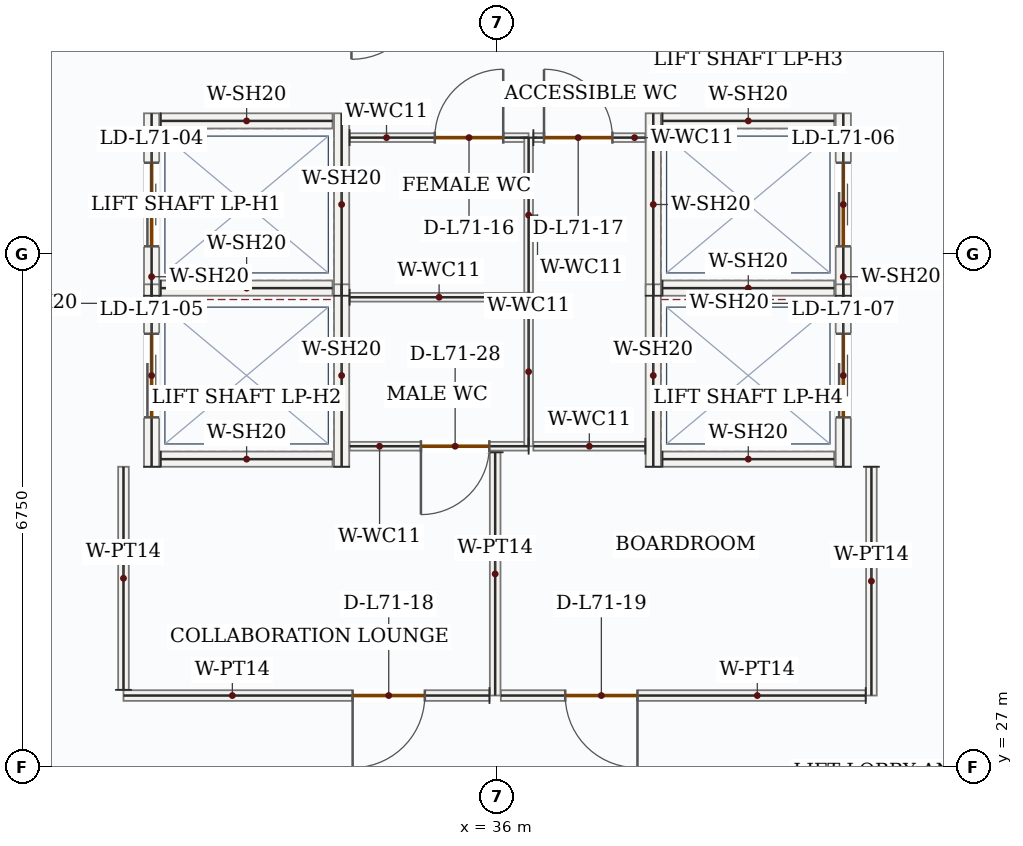
"""IFC4 building model, lengths in metres.
Left out: names, types, materials, properties, quantities, classifications, styles, units other than length and angle.
Written with IfcOpenShell. Run it as: python <this file> out.ifc"""

import sys

from ifc_helpers import new_model, si_unit, direction, frame, frame_2d, origin, place, context, subcontext, project, spatial, rectangle, extrude, source, transform, mapped, element, fill, save


model = new_model("IFC4")
c1 = context("Model", 3, precision=1e-05, world=origin(), true_north=direction((0.0, 1.0)))
c2 = subcontext(c1, "Body", "Model", "MODEL_VIEW")
j1 = project(units=[si_unit("LENGTHUNIT", "METRE"), si_unit("PLANEANGLEUNIT", "RADIAN")], contexts=[c1])
p1 = place(None, origin())
s1 = spatial("IfcSite", under=j1, at=p1, CompositionType="ELEMENT")
p2 = place(p1, origin())
s2 = spatial("IfcBuilding", under=s1, at=p2, CompositionType="ELEMENT")
p3 = place(p2, frame((0.0, 0.0, 295.35)))
s3 = spatial("IfcBuildingStorey", under=s2, at=p3, CompositionType="ELEMENT", Elevation=295.35)
p4 = place(p3, frame((31.45, 33.2, 0.0), z_axis=(0.0, 0.0, 1.0), x_axis=(0.0, 1.0, 0.0)))
e1 = element("IfcWall", 1, at=p4, inside=s3, PredefinedType="SOLIDWALL", context=c2, shape_type="SweptSolid", body=[
    extrude(rectangle(XDim=2.4, YDim=0.2, at=frame_2d((1.2, 0.0))), origin(), (0.0, 0.0, 1.0), 3.5),
])
p5 = place(p4, frame((0.65, 0.0, 0.0)))
e2 = element("IfcOpeningElement", 2, at=p5, cuts=e1, PredefinedType="OPENING", context=c2, shape_type="SweptSolid", body=[
    extrude(rectangle(XDim=1.1, YDim=2.15, at=frame_2d((0.55, 1.075))), frame((0.0, 0.11, 0.0), z_axis=(0.0, -1.0, 0.0), x_axis=(1.0, 0.0, 0.0)), (0.0, 0.0, 1.0), 0.22),
])
m1 = source(origin(), c2, "Body", "SweptSolid", [
    extrude(rectangle(XDim=2.4, YDim=0.2, at=frame_2d((1.2, 0.0))), origin(), (0.0, 0.0, 1.0), 3.5),
])
p6 = place(p3, frame((33.95, 33.2, 0.0), z_axis=(0.0, 0.0, 1.0), x_axis=(0.0, 1.0, 0.0)))
e3 = element("IfcWall", 3, at=p6, inside=s3, PredefinedType="SOLIDWALL", context=c2, shape_type="MappedRepresentation", body=[
    mapped(m1, transform((0.0, 0.0, 0.0), x_axis=(1.0, 0.0, 0.0), y_axis=(0.0, 1.0, 0.0), z_axis=(0.0, 0.0, 1.0), scale=1.0)),
])
m2 = source(origin(), c2, "Body", "SweptSolid", [
    extrude(rectangle(XDim=2.26, YDim=0.2, at=frame_2d((1.13, 0.0))), origin(), (0.0, 0.0, 1.0), 3.5),
])
for number, where, z_axis, x_axis in (
    (4, (31.57, 33.3, 0.0), (0.0, 0.0, 1.0), (1.0, 0.0, 0.0)),
    (5, (31.57, 35.5, 0.0), (0.0, 0.0, 1.0), (1.0, 0.0, 0.0)),
):
    element("IfcWall", number, at=place(p3, frame(where, z_axis=z_axis, x_axis=x_axis)), inside=s3, PredefinedType="SOLIDWALL", context=c2, shape_type="MappedRepresentation", body=[
        mapped(m2, transform((0.0, 0.0, 0.0), x_axis=(1.0, 0.0, 0.0), y_axis=(0.0, 1.0, 0.0), z_axis=(0.0, 0.0, 1.0), scale=1.0)),
    ])
p7 = place(p3, frame((31.45, 30.95, 0.0), z_axis=(0.0, 0.0, 1.0), x_axis=(0.0, 1.0, 0.0)))
e6 = element("IfcWall", 6, at=p7, inside=s3, PredefinedType="SOLIDWALL", context=c2, shape_type="SweptSolid", body=[
    extrude(rectangle(XDim=2.4, YDim=0.2, at=frame_2d((1.2, 0.0))), origin(), (0.0, 0.0, 1.0), 3.5),
])
p8 = place(p7, frame((0.65, 0.0, 0.0)))
e7 = element("IfcOpeningElement", 7, at=p8, cuts=e6, PredefinedType="OPENING", context=c2, shape_type="SweptSolid", body=[
    extrude(rectangle(XDim=1.1, YDim=2.15, at=frame_2d((0.55, 1.075))), frame((0.0, 0.11, 0.0), z_axis=(0.0, -1.0, 0.0), x_axis=(1.0, 0.0, 0.0)), (0.0, 0.0, 1.0), 0.22),
])
p9 = place(p3, frame((33.95, 30.95, 0.0), z_axis=(0.0, 0.0, 1.0), x_axis=(0.0, 1.0, 0.0)))
e8 = element("IfcWall", 8, at=p9, inside=s3, PredefinedType="SOLIDWALL", context=c2, shape_type="MappedRepresentation", body=[
    mapped(m1, transform((0.0, 0.0, 0.0), x_axis=(1.0, 0.0, 0.0), y_axis=(0.0, 1.0, 0.0), z_axis=(0.0, 0.0, 1.0), scale=1.0)),
])
p10 = place(p3, frame((31.57, 31.05, 0.0), z_axis=(0.0, 0.0, 1.0), x_axis=(1.0, 0.0, 0.0)))
e9 = element("IfcWall", 9, at=p10, inside=s3, PredefinedType="SOLIDWALL", context=c2, shape_type="MappedRepresentation", body=[
    mapped(m2, transform((0.0, 0.0, 0.0), x_axis=(1.0, 0.0, 0.0), y_axis=(0.0, 1.0, 0.0), z_axis=(0.0, 0.0, 1.0), scale=1.0)),
])
p11 = place(p3, frame((38.05, 33.2, 0.0), z_axis=(0.0, 0.0, 1.0), x_axis=(0.0, 1.0, 0.0)))
e10 = element("IfcWall", 10, at=p11, inside=s3, PredefinedType="SOLIDWALL", context=c2, shape_type="MappedRepresentation", body=[
    mapped(m1, transform((0.0, 0.0, 0.0), x_axis=(1.0, 0.0, 0.0), y_axis=(0.0, 1.0, 0.0), z_axis=(0.0, 0.0, 1.0), scale=1.0)),
])
p12 = place(p3, frame((40.55, 33.2, 0.0), z_axis=(0.0, 0.0, 1.0), x_axis=(0.0, 1.0, 0.0)))
e11 = element("IfcWall", 11, at=p12, inside=s3, PredefinedType="SOLIDWALL", context=c2, shape_type="SweptSolid", body=[
    extrude(rectangle(XDim=2.4, YDim=0.2, at=frame_2d((1.2, 0.0))), origin(), (0.0, 0.0, 1.0), 3.5),
])
p13 = place(p12, frame((0.65, 0.0, 0.0)))
e12 = element("IfcOpeningElement", 12, at=p13, cuts=e11, PredefinedType="OPENING", context=c2, shape_type="SweptSolid", body=[
    extrude(rectangle(XDim=1.1, YDim=2.15, at=frame_2d((0.55, 1.075))), frame((0.0, 0.11, 0.0), z_axis=(0.0, -1.0, 0.0), x_axis=(1.0, 0.0, 0.0)), (0.0, 0.0, 1.0), 0.22),
])
for number, where, z_axis, x_axis in (
    (13, (38.17, 33.3, 0.0), (0.0, 0.0, 1.0), (1.0, 0.0, 0.0)),
    (14, (38.17, 35.5, 0.0), (0.0, 0.0, 1.0), (1.0, 0.0, 0.0)),
):
    element("IfcWall", number, at=place(p3, frame(where, z_axis=z_axis, x_axis=x_axis)), inside=s3, PredefinedType="SOLIDWALL", context=c2, shape_type="MappedRepresentation", body=[
        mapped(m2, transform((0.0, 0.0, 0.0), x_axis=(1.0, 0.0, 0.0), y_axis=(0.0, 1.0, 0.0), z_axis=(0.0, 0.0, 1.0), scale=1.0)),
    ])
p14 = place(p3, frame((38.05, 30.95, 0.0), z_axis=(0.0, 0.0, 1.0), x_axis=(0.0, 1.0, 0.0)))
e15 = element("IfcWall", 15, at=p14, inside=s3, PredefinedType="SOLIDWALL", context=c2, shape_type="MappedRepresentation", body=[
    mapped(m1, transform((0.0, 0.0, 0.0), x_axis=(1.0, 0.0, 0.0), y_axis=(0.0, 1.0, 0.0), z_axis=(0.0, 0.0, 1.0), scale=1.0)),
])
p15 = place(p3, frame((40.55, 30.95, 0.0), z_axis=(0.0, 0.0, 1.0), x_axis=(0.0, 1.0, 0.0)))
e16 = element("IfcWall", 16, at=p15, inside=s3, PredefinedType="SOLIDWALL", context=c2, shape_type="SweptSolid", body=[
    extrude(rectangle(XDim=2.4, YDim=0.2, at=frame_2d((1.2, 0.0))), origin(), (0.0, 0.0, 1.0), 3.5),
])
p16 = place(p15, frame((0.65, 0.0, 0.0)))
e17 = element("IfcOpeningElement", 17, at=p16, cuts=e16, PredefinedType="OPENING", context=c2, shape_type="SweptSolid", body=[
    extrude(rectangle(XDim=1.1, YDim=2.15, at=frame_2d((0.55, 1.075))), frame((0.0, 0.11, 0.0), z_axis=(0.0, -1.0, 0.0), x_axis=(1.0, 0.0, 0.0)), (0.0, 0.0, 1.0), 0.22),
])
p17 = place(p3, frame((38.17, 31.05, 0.0), z_axis=(0.0, 0.0, 1.0), x_axis=(1.0, 0.0, 0.0)))
e18 = element("IfcWall", 18, at=p17, inside=s3, PredefinedType="SOLIDWALL", context=c2, shape_type="MappedRepresentation", body=[
    mapped(m2, transform((0.0, 0.0, 0.0), x_axis=(1.0, 0.0, 0.0), y_axis=(0.0, 1.0, 0.0), z_axis=(0.0, 0.0, 1.0), scale=1.0)),
])
p18 = place(p3, frame((36.41, 31.22, 0.0), z_axis=(0.0, 0.0, 1.0), x_axis=(-1.0, 0.0, 0.0)))
e19 = element("IfcWall", 19, at=p18, inside=s3, PredefinedType="PARTITIONING", context=c2, shape_type="SweptSolid", body=[
    extrude(rectangle(XDim=2.355, YDim=0.115, at=frame_2d((1.177, 0.0))), origin(), (0.0, 0.0, 1.0), 3.5),
])
p19 = place(p18, frame((0.517, 0.0, 0.0)))
e20 = element("IfcOpeningElement", 20, at=p19, cuts=e19, PredefinedType="OPENING", context=c2, shape_type="SweptSolid", body=[
    extrude(rectangle(XDim=0.9, YDim=2.1, at=frame_2d((0.45, 1.05))), frame((0.0, 0.067, 0.0), z_axis=(0.0, -1.0, 0.0), x_axis=(1.0, 0.0, 0.0)), (0.0, 0.0, 1.0), 0.135),
])
m3 = source(origin(), c2, "Body", "SweptSolid", [
    extrude(rectangle(XDim=2.355, YDim=0.115, at=frame_2d((1.177, 0.0))), origin(), (0.0, 0.0, 1.0), 3.5),
])
p20 = place(p3, frame((34.055, 33.18, 0.0), z_axis=(0.0, 0.0, 1.0), x_axis=(1.0, 0.0, 0.0)))
e21 = element("IfcWall", 21, at=p20, inside=s3, PredefinedType="PARTITIONING", context=c2, shape_type="MappedRepresentation", body=[
    mapped(m3, transform((0.0, 0.0, 0.0), x_axis=(1.0, 0.0, 0.0), y_axis=(0.0, 1.0, 0.0), z_axis=(0.0, 0.0, 1.0), scale=1.0)),
])
m4 = source(origin(), c2, "Body", "SweptSolid", [
    extrude(rectangle(XDim=1.96, YDim=0.115, at=frame_2d((0.98, 0.0))), origin(), (0.0, 0.0, 1.0), 3.5),
])
p21 = place(p3, frame((36.41, 33.18, 0.0), z_axis=(0.0, 0.0, 1.0), x_axis=(0.0, -1.0, 0.0)))
e22 = element("IfcWall", 22, at=p21, inside=s3, PredefinedType="PARTITIONING", context=c2, shape_type="MappedRepresentation", body=[
    mapped(m4, transform((0.0, 0.0, 0.0), x_axis=(1.0, 0.0, 0.0), y_axis=(0.0, 1.0, 0.0), z_axis=(0.0, 0.0, 1.0), scale=1.0)),
])
p22 = place(p3, frame((34.055, 35.28, 0.0), z_axis=(0.0, 0.0, 1.0), x_axis=(1.0, 0.0, 0.0)))
e23 = element("IfcWall", 23, at=p22, inside=s3, PredefinedType="PARTITIONING", context=c2, shape_type="SweptSolid", body=[
    extrude(rectangle(XDim=2.355, YDim=0.115, at=frame_2d((1.177, 0.0))), origin(), (0.0, 0.0, 1.0), 3.5),
])
p23 = place(p22, frame((1.121, 0.0, 0.0)))
e24 = element("IfcOpeningElement", 24, at=p23, cuts=e23, PredefinedType="OPENING", context=c2, shape_type="SweptSolid", body=[
    extrude(rectangle(XDim=0.9, YDim=2.1, at=frame_2d((0.45, 1.05))), frame((0.0, 0.067, 0.0), z_axis=(0.0, -1.0, 0.0), x_axis=(1.0, 0.0, 0.0)), (0.0, 0.0, 1.0), 0.135),
])
m5 = source(origin(), c2, "Body", "SweptSolid", [
    extrude(rectangle(XDim=2.04, YDim=0.115, at=frame_2d((1.02, 0.0))), origin(), (0.0, 0.0, 1.0), 3.5),
])
p24 = place(p3, frame((36.41, 35.28, 0.0), z_axis=(0.0, 0.0, 1.0), x_axis=(0.0, -1.0, 0.0)))
e25 = element("IfcWall", 25, at=p24, inside=s3, PredefinedType="PARTITIONING", context=c2, shape_type="MappedRepresentation", body=[
    mapped(m5, transform((0.0, 0.0, 0.0), x_axis=(1.0, 0.0, 0.0), y_axis=(0.0, 1.0, 0.0), z_axis=(0.0, 0.0, 1.0), scale=1.0)),
])
m6 = source(origin(), c2, "Body", "SweptSolid", [
    extrude(rectangle(XDim=1.473, YDim=0.115, at=frame_2d((0.736, 0.0))), origin(), (0.0, 0.0, 1.0), 3.5),
])
p25 = place(p3, frame((37.945, 31.22, 0.0), z_axis=(0.0, 0.0, 1.0), x_axis=(-1.0, 0.0, 0.0)))
e26 = element("IfcWall", 26, at=p25, inside=s3, PredefinedType="PARTITIONING", context=c2, shape_type="MappedRepresentation", body=[
    mapped(m6, transform((0.0, 0.0, 0.0), x_axis=(1.0, 0.0, 0.0), y_axis=(0.0, 1.0, 0.0), z_axis=(0.0, 0.0, 1.0), scale=1.0)),
])
p26 = place(p3, frame((36.472, 35.28, 0.0), z_axis=(0.0, 0.0, 1.0), x_axis=(1.0, 0.0, 0.0)))
e27 = element("IfcWall", 27, at=p26, inside=s3, PredefinedType="PARTITIONING", context=c2, shape_type="SweptSolid", body=[
    extrude(rectangle(XDim=1.473, YDim=0.115, at=frame_2d((0.736, 0.0))), origin(), (0.0, 0.0, 1.0), 3.5),
])
p27 = place(p26, frame((0.14, 0.0, 0.0)))
e28 = element("IfcOpeningElement", 28, at=p27, cuts=e27, PredefinedType="OPENING", context=c2, shape_type="SweptSolid", body=[
    extrude(rectangle(XDim=0.9, YDim=2.1, at=frame_2d((0.45, 1.05))), frame((0.0, 0.067, 0.0), z_axis=(0.0, -1.0, 0.0), x_axis=(1.0, 0.0, 0.0)), (0.0, 0.0, 1.0), 0.135),
])
m7 = source(origin(), c2, "Body", "SweptSolid", [
    extrude(rectangle(XDim=3.2, YDim=0.14, at=frame_2d((1.6, 0.0))), origin(), (0.0, 0.0, 1.0), 3.5),
])
p28 = place(p3, frame((35.97, 31.14, 0.0), z_axis=(0.0, 0.0, 1.0), x_axis=(0.0, -1.0, 0.0)))
e29 = element("IfcWall", 29, at=p28, inside=s3, PredefinedType="PARTITIONING", context=c2, shape_type="MappedRepresentation", body=[
    mapped(m7, transform((0.0, 0.0, 0.0), x_axis=(1.0, 0.0, 0.0), y_axis=(0.0, 1.0, 0.0), z_axis=(0.0, 0.0, 1.0), scale=1.0)),
])
p29 = place(p3, frame((35.895, 27.94, 0.0), z_axis=(0.0, 0.0, 1.0), x_axis=(-1.0, 0.0, 0.0)))
e30 = element("IfcWall", 30, at=p29, inside=s3, PredefinedType="PARTITIONING", context=c2, shape_type="SweptSolid", body=[
    extrude(rectangle(XDim=4.815, YDim=0.14, at=frame_2d((2.407, 0.0))), origin(), (0.0, 0.0, 1.0), 3.5),
])
p30 = place(p29, frame((0.85, 0.0, 0.0)))
e31 = element("IfcOpeningElement", 31, at=p30, cuts=e30, PredefinedType="OPENING", context=c2, shape_type="SweptSolid", body=[
    extrude(rectangle(XDim=0.95, YDim=2.15, at=frame_2d((0.475, 1.075))), frame((0.0, 0.08, 0.0), z_axis=(0.0, -1.0, 0.0), x_axis=(1.0, 0.0, 0.0)), (0.0, 0.0, 1.0), 0.16),
])
m8 = source(origin(), c2, "Body", "SweptSolid", [
    extrude(rectangle(XDim=2.935, YDim=0.14, at=frame_2d((1.468, 0.0))), origin(), (0.0, 0.0, 1.0), 3.5),
])
p31 = place(p3, frame((31.08, 28.015, 0.0), z_axis=(0.0, 0.0, 1.0), x_axis=(0.0, 1.0, 0.0)))
e32 = element("IfcWall", 32, at=p31, inside=s3, PredefinedType="PARTITIONING", context=c2, shape_type="MappedRepresentation", body=[
    mapped(m8, transform((0.0, 0.0, 0.0), x_axis=(1.0, 0.0, 0.0), y_axis=(0.0, 1.0, 0.0), z_axis=(0.0, 0.0, 1.0), scale=1.0)),
])
m9 = source(origin(), c2, "Body", "SweptSolid", [
    extrude(rectangle(XDim=3.01, YDim=0.14, at=frame_2d((1.505, 0.0))), origin(), (0.0, 0.0, 1.0), 3.5),
])
p32 = place(p3, frame((40.92, 30.95, 0.0), z_axis=(0.0, 0.0, 1.0), x_axis=(0.0, -1.0, 0.0)))
e33 = element("IfcWall", 33, at=p32, inside=s3, PredefinedType="PARTITIONING", context=c2, shape_type="MappedRepresentation", body=[
    mapped(m9, transform((0.0, 0.0, 0.0), x_axis=(1.0, 0.0, 0.0), y_axis=(0.0, 1.0, 0.0), z_axis=(0.0, 0.0, 1.0), scale=1.0)),
])
p33 = place(p3, frame((40.845, 27.94, 0.0), z_axis=(0.0, 0.0, 1.0), x_axis=(-1.0, 0.0, 0.0)))
e34 = element("IfcWall", 34, at=p33, inside=s3, PredefinedType="PARTITIONING", context=c2, shape_type="SweptSolid", body=[
    extrude(rectangle(XDim=4.8, YDim=0.14, at=frame_2d((2.4, 0.0))), origin(), (0.0, 0.0, 1.0), 3.5),
])
p34 = place(p33, frame((3.003, 0.0, 0.0)))
e35 = element("IfcOpeningElement", 35, at=p34, cuts=e34, PredefinedType="OPENING", context=c2, shape_type="SweptSolid", body=[
    extrude(rectangle(XDim=0.95, YDim=2.15, at=frame_2d((0.475, 1.075))), frame((0.0, 0.08, 0.0), z_axis=(0.0, -1.0, 0.0), x_axis=(1.0, 0.0, 0.0)), (0.0, 0.0, 1.0), 0.16),
])
m10 = source(origin(), c2, "Body", "SweptSolid", [
    extrude(rectangle(XDim=1.1, YDim=2.15, at=frame_2d((0.55, 1.075))), frame((0.0, 0.025, 0.0), z_axis=(0.0, -1.0, 0.0), x_axis=(1.0, 0.0, 0.0)), (0.0, 0.0, 1.0), 0.05),
])
p35 = place(p5, origin())
e36 = element("IfcDoor", 36, at=p35, inside=s3, OperationType="DOUBLE_DOOR_SLIDING", PredefinedType="DOOR", context=c2, shape_type="MappedRepresentation", body=[
    mapped(m10, transform((0.0, 0.0, 0.0), x_axis=(1.0, 0.0, 0.0), y_axis=(0.0, 1.0, 0.0), z_axis=(0.0, 0.0, 1.0), scale=1.0)),
])
fill(e2, e36)
p36 = place(p8, origin())
e37 = element("IfcDoor", 37, at=p36, inside=s3, OperationType="DOUBLE_DOOR_SLIDING", PredefinedType="DOOR", context=c2, shape_type="MappedRepresentation", body=[
    mapped(m10, transform((0.0, 0.0, 0.0), x_axis=(1.0, 0.0, 0.0), y_axis=(0.0, 1.0, 0.0), z_axis=(0.0, 0.0, 1.0), scale=1.0)),
])
fill(e7, e37)
p37 = place(p13, origin())
e38 = element("IfcDoor", 38, at=p37, inside=s3, OperationType="DOUBLE_DOOR_SLIDING", PredefinedType="DOOR", context=c2, shape_type="MappedRepresentation", body=[
    mapped(m10, transform((0.0, 0.0, 0.0), x_axis=(1.0, 0.0, 0.0), y_axis=(0.0, 1.0, 0.0), z_axis=(0.0, 0.0, 1.0), scale=1.0)),
])
fill(e12, e38)
p38 = place(p16, origin())
e39 = element("IfcDoor", 39, at=p38, inside=s3, OperationType="DOUBLE_DOOR_SLIDING", PredefinedType="DOOR", context=c2, shape_type="MappedRepresentation", body=[
    mapped(m10, transform((0.0, 0.0, 0.0), x_axis=(1.0, 0.0, 0.0), y_axis=(0.0, 1.0, 0.0), z_axis=(0.0, 0.0, 1.0), scale=1.0)),
])
fill(e17, e39)
m11 = source(origin(), c2, "Body", "SweptSolid", [
    extrude(rectangle(XDim=0.9, YDim=2.1, at=frame_2d((0.45, 1.05))), frame((0.0, 0.025, 0.0), z_axis=(0.0, -1.0, 0.0), x_axis=(1.0, 0.0, 0.0)), (0.0, 0.0, 1.0), 0.05),
])
p39 = place(p23, origin())
e40 = element("IfcDoor", 40, at=p39, inside=s3, OperationType="SINGLE_SWING_RIGHT", PredefinedType="DOOR", context=c2, shape_type="MappedRepresentation", body=[
    mapped(m11, transform((0.0, 0.0, 0.0), x_axis=(1.0, 0.0, 0.0), y_axis=(0.0, 1.0, 0.0), z_axis=(0.0, 0.0, 1.0), scale=1.0)),
])
fill(e24, e40)
p40 = place(p27, origin())
e41 = element("IfcDoor", 41, at=p40, inside=s3, OperationType="SINGLE_SWING_LEFT", PredefinedType="DOOR", context=c2, shape_type="MappedRepresentation", body=[
    mapped(m11, transform((0.0, 0.0, 0.0), x_axis=(1.0, 0.0, 0.0), y_axis=(0.0, 1.0, 0.0), z_axis=(0.0, 0.0, 1.0), scale=1.0)),
])
fill(e28, e41)
m12 = source(origin(), c2, "Body", "SweptSolid", [
    extrude(rectangle(XDim=0.95, YDim=2.15, at=frame_2d((0.475, 1.075))), frame((0.0, 0.025, 0.0), z_axis=(0.0, -1.0, 0.0), x_axis=(1.0, 0.0, 0.0)), (0.0, 0.0, 1.0), 0.05),
])
p41 = place(p30, origin())
e42 = element("IfcDoor", 42, at=p41, inside=s3, OperationType="SINGLE_SWING_RIGHT", PredefinedType="DOOR", context=c2, shape_type="MappedRepresentation", body=[
    mapped(m12, transform((0.0, 0.0, 0.0), x_axis=(1.0, 0.0, 0.0), y_axis=(0.0, 1.0, 0.0), z_axis=(0.0, 0.0, 1.0), scale=1.0)),
])
fill(e31, e42)
p42 = place(p34, origin())
e43 = element("IfcDoor", 43, at=p42, inside=s3, OperationType="SINGLE_SWING_LEFT", PredefinedType="DOOR", context=c2, shape_type="MappedRepresentation", body=[
    mapped(m12, transform((0.0, 0.0, 0.0), x_axis=(1.0, 0.0, 0.0), y_axis=(0.0, 1.0, 0.0), z_axis=(0.0, 0.0, 1.0), scale=1.0)),
])
fill(e35, e43)
p43 = place(p19, origin())
e44 = element("IfcDoor", 44, at=p43, inside=s3, OperationType="SINGLE_SWING_RIGHT", PredefinedType="DOOR", context=c2, shape_type="MappedRepresentation", body=[
    mapped(m11, transform((0.0, 0.0, 0.0), x_axis=(1.0, 0.0, 0.0), y_axis=(0.0, 1.0, 0.0), z_axis=(0.0, 0.0, 1.0), scale=1.0)),
])
fill(e20, e44)
save(model, sys.argv[1])
